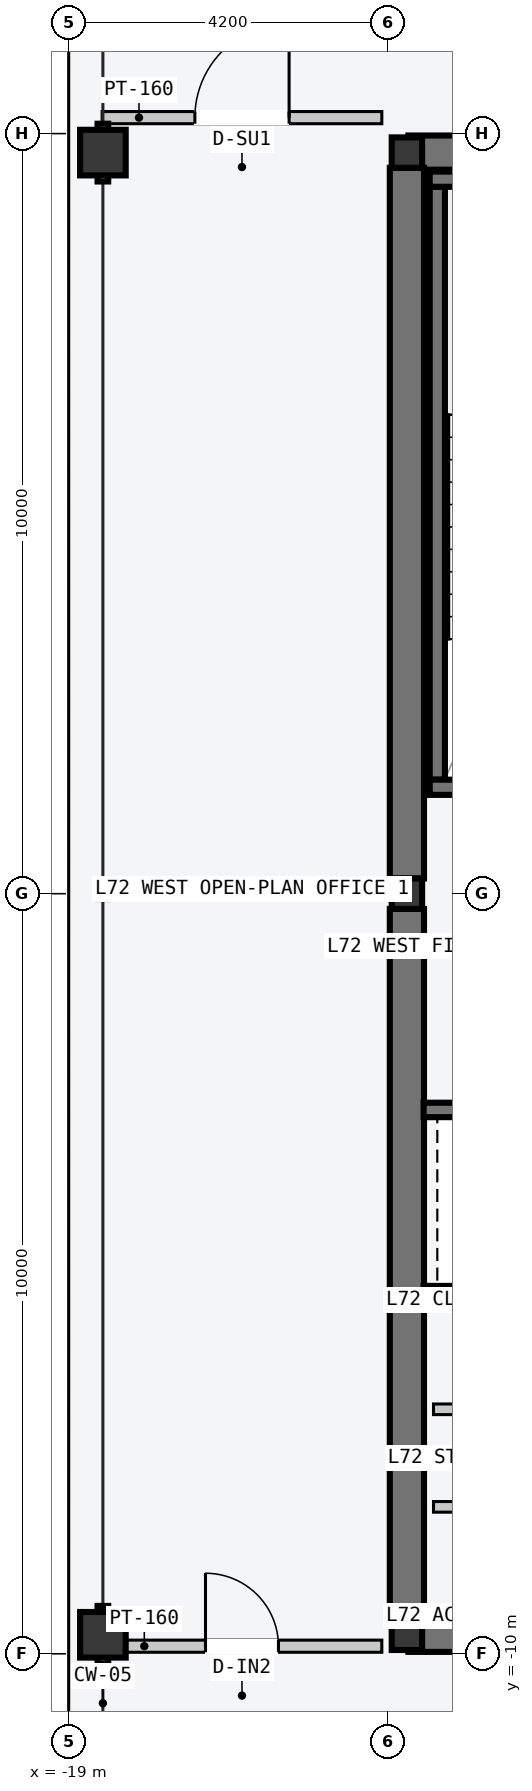
"""IFC4 building model, lengths in metres.
Left out: names, types, materials, properties, quantities, classifications, styles, units other than length and angle.
Written with IfcOpenShell. Run it as: python <this file> out.ifc"""

import sys

from ifc_helpers import new_model, si_unit, direction, frame, frame_2d, origin, origin_2d, place, context, subcontext, project, spatial, rectangle, hollow_rectangle, i_section, extrude, element, fill, save


model = new_model("IFC4")
c1 = context("Model", 3, precision=1e-05, world=origin(), true_north=direction((0.0, 1.0)))
c2 = subcontext(c1, "Body", "Model", "MODEL_VIEW")
j1 = project(units=[si_unit("LENGTHUNIT", "METRE"), si_unit("PLANEANGLEUNIT", "RADIAN")], contexts=[c1])
p1 = place(None, origin())
s1 = spatial("IfcSite", under=j1, at=p1, CompositionType="ELEMENT")
p2 = place(p1, origin())
s2 = spatial("IfcBuilding", under=s1, at=p2, CompositionType="ELEMENT")
p3 = place(p2, frame((0.0, 0.0, 272.4)))
s3 = spatial("IfcBuildingStorey", under=s2, at=p3, CompositionType="ELEMENT", Elevation=272.4)
for number, where, z_axis, x_axis in (
    (1, (-14.53, -9.75, -0.2), (0.0, 0.0, 1.0), (1.0, 0.0, 0.0)),
    (2, (-14.53, 9.75, -0.2), (0.0, 0.0, 1.0), (1.0, 0.0, 0.0)),
):
    element("IfcWall", number, at=place(p3, frame(where, z_axis=z_axis, x_axis=x_axis)), inside=s3, PredefinedType="SHEAR", context=c2, shape_type="SweptSolid", body=[
        extrude(rectangle(XDim=6.46, YDim=0.45, at=frame_2d((3.23, 0.0))), origin(), (0.0, 0.0, 1.0), 3.6),
    ])
for number, where, z_axis, x_axis in (
    (3, (-14.55, -9.55, -0.2), (0.0, 0.0, 1.0), (0.0, 1.0, 0.0)),
    (4, (-14.55, 0.2, -0.2), (0.0, 0.0, 1.0), (0.0, 1.0, 0.0)),
):
    element("IfcWall", number, at=place(p3, frame(where, z_axis=z_axis, x_axis=x_axis)), inside=s3, PredefinedType="SHEAR", context=c2, shape_type="SweptSolid", body=[
        extrude(rectangle(XDim=9.35, YDim=0.45, at=frame_2d((4.675, 0.0))), origin(), (0.0, 0.0, 1.0), 3.6),
    ])
p4 = place(p3, frame((-14.15, 1.5, -0.2), z_axis=(0.0, 0.0, 1.0), x_axis=(0.0, 1.0, 0.0)))
e5 = element("IfcWall", 5, at=p4, inside=s3, PredefinedType="SOLIDWALL", context=c2, shape_type="SweptSolid", body=[
    extrude(rectangle(XDim=7.8, YDim=0.2, at=frame_2d((3.9, 0.0))), origin(), (0.0, 0.0, 1.0), 3.6),
])
p5 = place(p3, frame((-14.25, 1.4, -0.2), z_axis=(0.0, 0.0, 1.0), x_axis=(1.0, 0.0, 0.0)))
e6 = element("IfcWall", 6, at=p5, inside=s3, PredefinedType="SOLIDWALL", context=c2, shape_type="SweptSolid", body=[
    extrude(rectangle(XDim=3.72, YDim=0.2, at=frame_2d((1.86, 0.0))), origin(), (0.0, 0.0, 1.0), 3.6),
])
p6 = place(p5, frame((1.5, 0.0, 0.2)))
e7 = element("IfcOpeningElement", 7, at=p6, cuts=e6, PredefinedType="OPENING", context=c2, shape_type="SweptSolid", body=[
    extrude(rectangle(XDim=1.12, YDim=2.18, at=frame_2d((0.56, 1.09))), frame((0.0, 0.11, 0.0), z_axis=(0.0, -1.0, 0.0), x_axis=(1.0, 0.0, 0.0)), (0.0, 0.0, 1.0), 0.22),
])
p7 = place(p3, frame((-14.25, 9.4, -0.2), z_axis=(0.0, 0.0, 1.0), x_axis=(1.0, 0.0, 0.0)))
e8 = element("IfcWall", 8, at=p7, inside=s3, PredefinedType="SOLIDWALL", context=c2, shape_type="SweptSolid", body=[
    extrude(rectangle(XDim=3.72, YDim=0.2, at=frame_2d((1.86, 0.0))), origin(), (0.0, 0.0, 1.0), 3.6),
])
for number, where, z_axis, x_axis in (
    (9, (-14.55, -9.75, 0.0), (0.0, 0.0, 1.0), (1.0, 0.0, 0.0)),
    (10, (-14.55, 0.0, 0.0), (0.0, 0.0, 1.0), (1.0, 0.0, 0.0)),
    (11, (-14.55, 9.75, 0.0), (0.0, 0.0, 1.0), (1.0, 0.0, 0.0)),
):
    element("IfcColumn", number, at=place(p3, frame(where, z_axis=z_axis, x_axis=x_axis)), inside=s3, PredefinedType="COLUMN", context=c2, shape_type="SweptSolid", body=[
        extrude(i_section(OverallWidth=0.4, OverallDepth=0.4, WebThickness=0.013, FlangeThickness=0.021, at=origin_2d()), origin(), (0.0, 0.0, 1.0), 3.6),
    ])
for number, where, z_axis, x_axis in (
    (12, (-18.55, -9.75, 0.0), (0.0, 0.0, 1.0), (0.0, 1.0, 0.0)),
    (13, (-18.55, 9.75, 0.0), (0.0, 0.0, 1.0), (0.0, 1.0, 0.0)),
):
    element("IfcColumn", number, at=place(p3, frame(where, z_axis=z_axis, x_axis=x_axis)), inside=s3, PredefinedType="COLUMN", context=c2, shape_type="SweptSolid", body=[
        extrude(hollow_rectangle(XDim=0.6, YDim=0.6, WallThickness=0.025, at=origin_2d()), origin(), (0.0, 0.0, 1.0), 3.6),
    ])
p8 = place(p3, frame((-14.33, -2.845, -0.2), z_axis=(0.0, 0.0, 1.0), x_axis=(1.0, 0.0, 0.0)))
e14 = element("IfcWall", 14, at=p8, inside=s3, PredefinedType="SOLIDWALL", context=c2, shape_type="SweptSolid", body=[
    extrude(rectangle(XDim=2.68, YDim=0.19, at=frame_2d((1.34, 0.0))), origin(), (0.0, 0.0, 1.0), 3.6),
])
p9 = place(p8, frame((0.83, 0.0, 0.2)))
e15 = element("IfcOpeningElement", 15, at=p9, cuts=e14, PredefinedType="OPENING", context=c2, shape_type="SweptSolid", body=[
    extrude(rectangle(XDim=1.2, YDim=2.2, at=frame_2d((0.6, 1.1))), frame((0.0, 0.105, 0.0), z_axis=(0.0, -1.0, 0.0), x_axis=(1.0, 0.0, 0.0)), (0.0, 0.0, 1.0), 0.21),
])
p10 = place(p3, frame((-14.33, -5.255, -0.2), z_axis=(0.0, 0.0, 1.0), x_axis=(1.0, 0.0, 0.0)))
e16 = element("IfcWall", 16, at=p10, inside=s3, PredefinedType="SOLIDWALL", context=c2, shape_type="SweptSolid", body=[
    extrude(rectangle(XDim=2.68, YDim=0.19, at=frame_2d((1.34, 0.0))), origin(), (0.0, 0.0, 1.0), 3.6),
])
for number, where, z_axis, x_axis in (
    (17, (-11.7, -8.067, 0.0), (0.0, 0.0, 1.0), (-1.0, 0.0, 0.0)),
    (18, (-11.7, -6.783, 0.0), (0.0, 0.0, 1.0), (-1.0, 0.0, 0.0)),
):
    element("IfcWall", number, at=place(p3, frame(where, z_axis=z_axis, x_axis=x_axis)), inside=s3, PredefinedType="PARTITIONING", context=c2, shape_type="SweptSolid", body=[
        extrude(rectangle(XDim=2.5, YDim=0.14, at=frame_2d((1.25, 0.0))), origin(), (0.0, 0.0, 1.0), 3.4),
    ])
p11 = place(p3, frame((-18.56, 10.21, 0.0), z_axis=(0.0, 0.0, 1.0), x_axis=(1.0, 0.0, 0.0)))
e19 = element("IfcWall", 19, at=p11, inside=s3, PredefinedType="PARTITIONING", context=c2, shape_type="SweptSolid", body=[
    extrude(rectangle(XDim=3.68, YDim=0.16, at=frame_2d((1.84, 0.0))), origin(), (0.0, 0.0, 1.0), 3.4),
])
p12 = place(p11, frame((1.22, 0.0, 0.0)))
e20 = element("IfcOpeningElement", 20, at=p12, cuts=e19, PredefinedType="OPENING", context=c2, shape_type="SweptSolid", body=[
    extrude(rectangle(XDim=1.24, YDim=2.24, at=frame_2d((0.62, 1.12))), frame((0.0, 0.09, 0.0), z_axis=(0.0, -1.0, 0.0), x_axis=(1.0, 0.0, 0.0)), (0.0, 0.0, 1.0), 0.18),
])
p13 = place(p3, frame((-18.56, -9.9, 0.0), z_axis=(0.0, 0.0, 1.0), x_axis=(1.0, 0.0, 0.0)))
e21 = element("IfcWall", 21, at=p13, inside=s3, PredefinedType="PARTITIONING", context=c2, shape_type="SweptSolid", body=[
    extrude(rectangle(XDim=3.68, YDim=0.16, at=frame_2d((1.84, 0.0))), origin(), (0.0, 0.0, 1.0), 3.4),
])
p14 = place(p13, frame((1.36, 0.0, 0.0)))
e22 = element("IfcOpeningElement", 22, at=p14, cuts=e21, PredefinedType="OPENING", context=c2, shape_type="SweptSolid", body=[
    extrude(rectangle(XDim=0.96, YDim=2.18, at=frame_2d((0.48, 1.09))), frame((0.0, 0.09, 0.0), z_axis=(0.0, -1.0, 0.0), x_axis=(1.0, 0.0, 0.0)), (0.0, 0.0, 1.0), 0.18),
])
p15 = place(p12, origin())
e23 = element("IfcDoor", 23, at=p15, inside=s3, OperationType="SINGLE_SWING_RIGHT", PredefinedType="DOOR", context=c2, shape_type="SweptSolid", body=[
    extrude(rectangle(XDim=1.24, YDim=2.24, at=frame_2d((0.62, 1.12))), frame((0.0, 0.025, 0.0), z_axis=(0.0, -1.0, 0.0), x_axis=(1.0, 0.0, 0.0)), (0.0, 0.0, 1.0), 0.05),
])
fill(e20, e23)
p16 = place(p14, origin())
e24 = element("IfcDoor", 24, at=p16, inside=s3, OperationType="SINGLE_SWING_LEFT", PredefinedType="DOOR", context=c2, shape_type="SweptSolid", body=[
    extrude(rectangle(XDim=0.96, YDim=2.18, at=frame_2d((0.48, 1.09))), frame((0.0, 0.025, 0.0), z_axis=(0.0, -1.0, 0.0), x_axis=(1.0, 0.0, 0.0)), (0.0, 0.0, 1.0), 0.05),
])
fill(e22, e24)
save(model, sys.argv[1])
